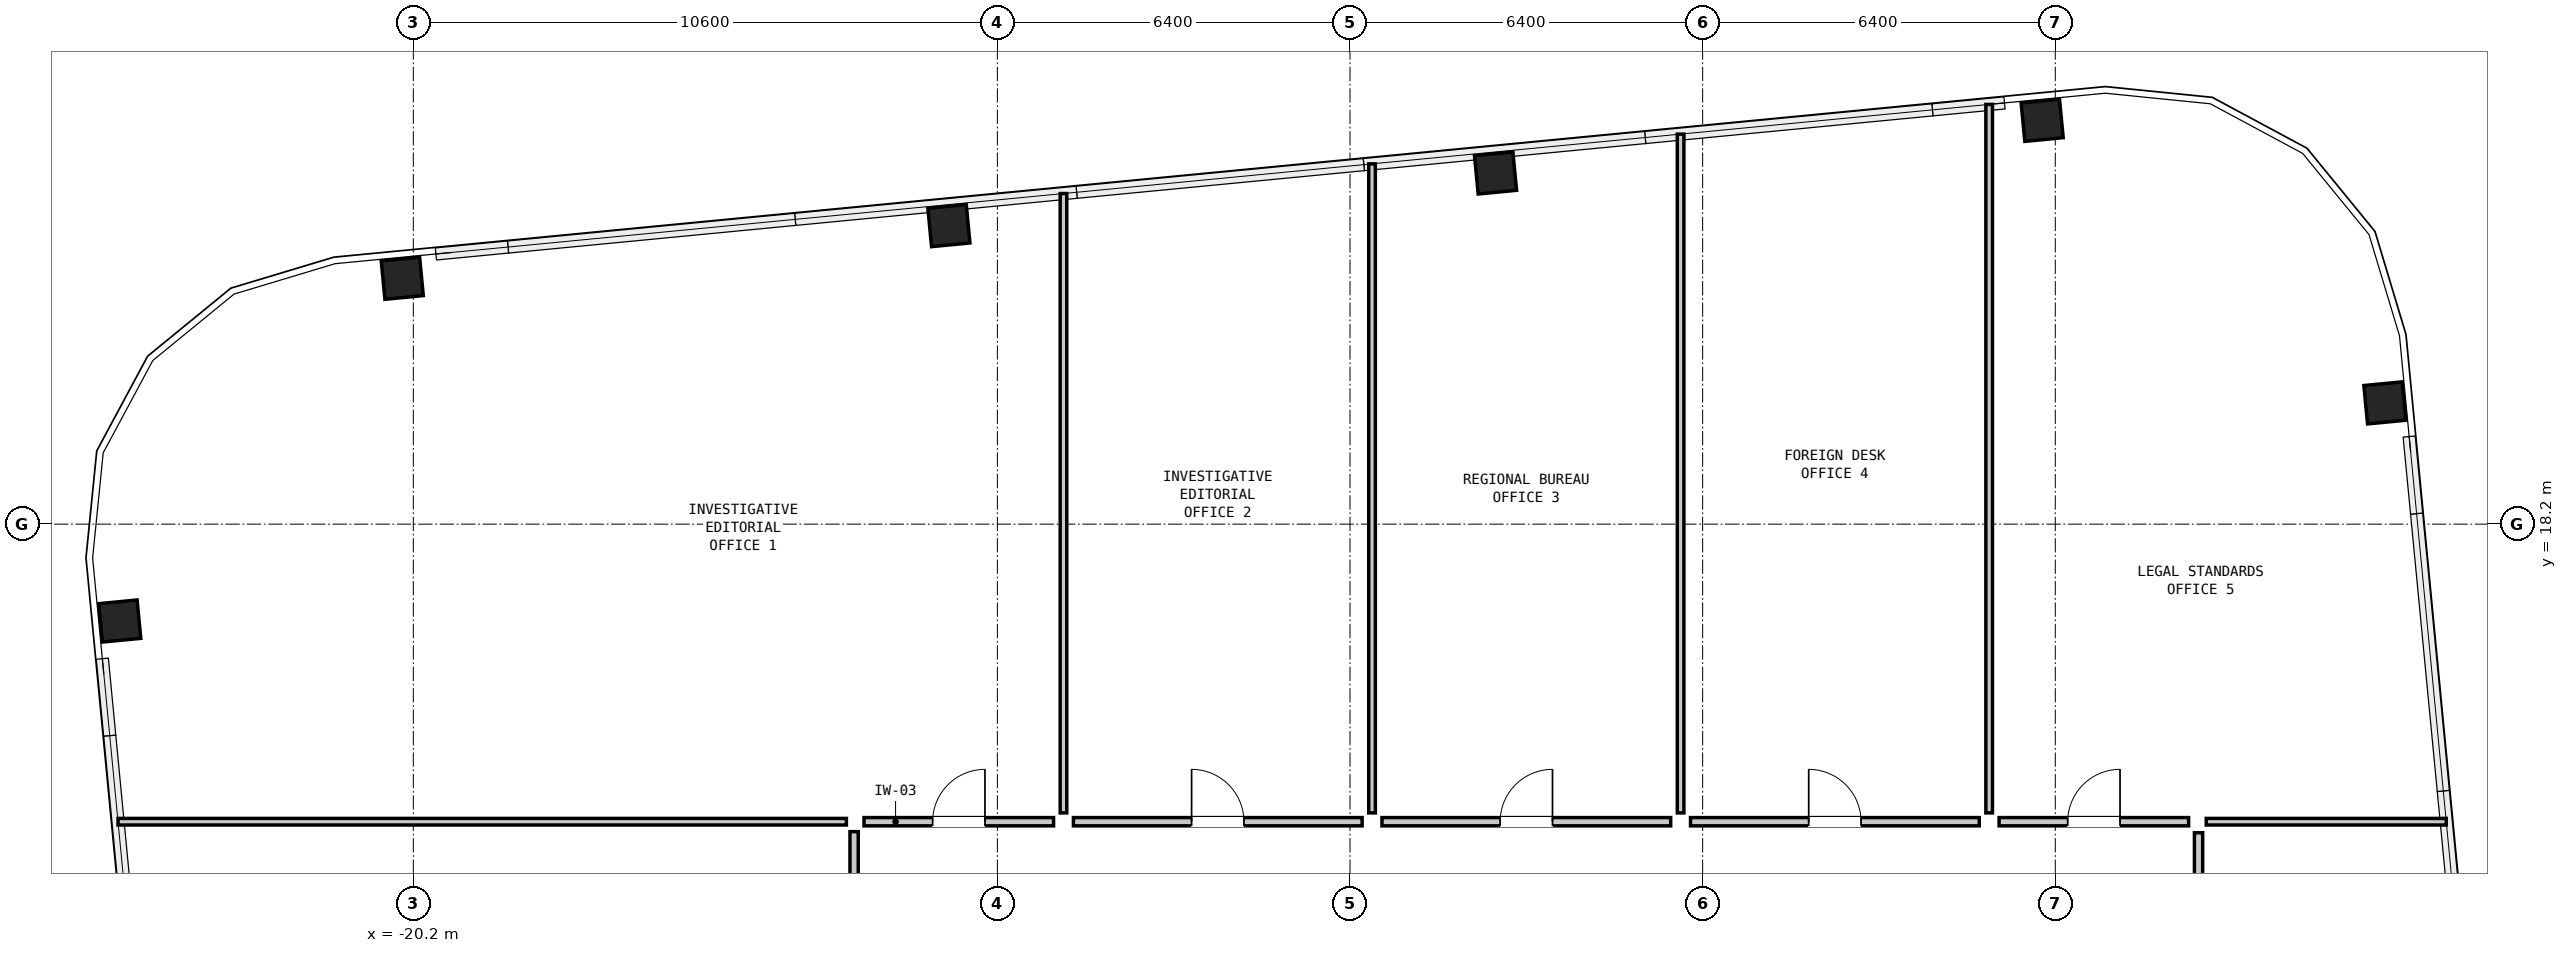
"""IFC4 building model, lengths in metres.
Left out: names, types, materials, properties, quantities, classifications, styles, units other than length and angle.
Written with IfcOpenShell. Run it as: python <this file> out.ifc"""

import sys

from ifc_helpers import new_model, si_unit, direction, frame, frame_2d, origin, origin_2d, place, context, subcontext, project, spatial, rectangle, hollow_rectangle, extrude, element, fill, save


model = new_model("IFC4")
c1 = context("Model", 3, precision=1e-05, world=origin(), true_north=direction((0.0, 1.0)))
c2 = subcontext(c1, "Body", "Model", "MODEL_VIEW")
j1 = project(units=[si_unit("LENGTHUNIT", "METRE"), si_unit("PLANEANGLEUNIT", "RADIAN")], contexts=[c1])
p1 = place(None, origin())
s1 = spatial("IfcSite", under=j1, at=p1, CompositionType="ELEMENT")
p2 = place(p1, origin())
s2 = spatial("IfcBuilding", under=s1, at=p2, CompositionType="ELEMENT")
p3 = place(p2, frame((0.0, 0.0, 165.3)))
s3 = spatial("IfcBuildingStorey", under=s2, at=p3, CompositionType="ELEMENT", Elevation=165.3)
for number, where, z_axis, x_axis in (
    (1, (15.582, 20.4, 0.0), (0.0, 0.0, 1.0), (-0.096, 0.995, 0.0)),
    (2, (9.362, 25.528, 0.0), (0.0, 0.0, 1.0), (0.995, 0.096, 0.0)),
    (3, (-0.559, 24.573, 0.0), (0.0, 0.0, 1.0), (0.995, 0.096, 0.0)),
    (4, (-10.479, 23.617, 0.0), (0.0, 0.0, 1.0), (0.995, 0.096, 0.0)),
    (5, (-20.4, 22.662, 0.0), (0.0, 0.0, 1.0), (0.995, 0.096, 0.0)),
    (6, (-25.528, 16.442, 0.0), (0.0, 0.0, 1.0), (-0.096, 0.995, 0.0)),
):
    element("IfcColumn", number, at=place(p3, frame(where, z_axis=z_axis, x_axis=x_axis)), inside=s3, PredefinedType="COLUMN", context=c2, shape_type="SweptSolid", body=[
        extrude(hollow_rectangle(XDim=0.7, YDim=0.7, WallThickness=0.045, at=origin_2d()), origin(), (0.0, 0.0, 1.0), 3.05),
    ])
p4 = place(p3, frame((-25.559, 12.8, 0.0), z_axis=(0.0, 0.0, 1.0), x_axis=(1.0, 0.0, 0.0)))
e7 = element("IfcWall", 7, at=p4, inside=s3, PredefinedType="PARTITIONING", context=c2, shape_type="SweptSolid", body=[
    extrude(rectangle(XDim=13.219, YDim=0.12, at=frame_2d((6.609, 0.0))), origin(), (0.0, 0.0, 1.0), 2.83),
])
p5 = place(p3, frame((12.34, 12.8, 0.0), z_axis=(0.0, 0.0, 1.0), x_axis=(1.0, 0.0, 0.0)))
e8 = element("IfcWall", 8, at=p5, inside=s3, PredefinedType="PARTITIONING", context=c2, shape_type="SweptSolid", body=[
    extrude(rectangle(XDim=4.355, YDim=0.12, at=frame_2d((2.178, 0.0))), origin(), (0.0, 0.0, 1.0), 2.83),
])
p6 = place(p3, frame((-8.4, 12.96, 0.0), z_axis=(0.0, 0.0, 1.0), x_axis=(0.0, 1.0, 0.0)))
e9 = element("IfcWall", 9, at=p6, inside=s3, PredefinedType="PARTITIONING", context=c2, shape_type="SweptSolid", body=[
    extrude(rectangle(XDim=11.239, YDim=0.12, at=frame_2d((5.62, 0.0))), origin(), (0.0, 0.0, 1.0), 2.83),
])
p7 = place(p3, frame((-2.8, 12.96, 0.0), z_axis=(0.0, 0.0, 1.0), x_axis=(0.0, 1.0, 0.0)))
e10 = element("IfcWall", 10, at=p7, inside=s3, PredefinedType="PARTITIONING", context=c2, shape_type="SweptSolid", body=[
    extrude(rectangle(XDim=11.779, YDim=0.12, at=frame_2d((5.889, 0.0))), origin(), (0.0, 0.0, 1.0), 2.347),
])
p8 = place(p3, frame((2.8, 12.96, 0.0), z_axis=(0.0, 0.0, 1.0), x_axis=(0.0, 1.0, 0.0)))
e11 = element("IfcWall", 11, at=p8, inside=s3, PredefinedType="PARTITIONING", context=c2, shape_type="SweptSolid", body=[
    extrude(rectangle(XDim=12.318, YDim=0.12, at=frame_2d((6.159, 0.0))), origin(), (0.0, 0.0, 1.0), 2.347),
])
p9 = place(p3, frame((8.4, 12.96, 0.0), z_axis=(0.0, 0.0, 1.0), x_axis=(0.0, 1.0, 0.0)))
e12 = element("IfcWall", 12, at=p9, inside=s3, PredefinedType="PARTITIONING", context=c2, shape_type="SweptSolid", body=[
    extrude(rectangle(XDim=12.857, YDim=0.12, at=frame_2d((6.428, 0.0))), origin(), (0.0, 0.0, 1.0), 2.83),
])
p10 = place(p3, frame((-12.02, 12.8, 0.0), z_axis=(0.0, 0.0, 1.0), x_axis=(1.0, 0.0, 0.0)))
e13 = element("IfcWall", 13, at=p10, inside=s3, PredefinedType="PARTITIONING", context=c2, shape_type="SweptSolid", body=[
    extrude(rectangle(XDim=3.44, YDim=0.15, at=frame_2d((1.72, 0.0))), origin(), (0.0, 0.0, 1.0), 2.83),
])
p11 = place(p10, frame((1.245, 0.0, 0.0)))
e14 = element("IfcOpeningElement", 14, at=p11, cuts=e13, PredefinedType="OPENING", context=c2, shape_type="SweptSolid", body=[
    extrude(rectangle(XDim=0.95, YDim=2.1, at=frame_2d((0.475, 1.05))), frame((0.0, 0.087, 0.0), z_axis=(0.0, -1.0, 0.0), x_axis=(1.0, 0.0, 0.0)), (0.0, 0.0, 1.0), 0.174),
])
p12 = place(p3, frame((-8.22, 12.8, 0.0), z_axis=(0.0, 0.0, 1.0), x_axis=(1.0, 0.0, 0.0)))
e15 = element("IfcWall", 15, at=p12, inside=s3, PredefinedType="PARTITIONING", context=c2, shape_type="SweptSolid", body=[
    extrude(rectangle(XDim=5.24, YDim=0.15, at=frame_2d((2.62, 0.0))), origin(), (0.0, 0.0, 1.0), 2.83),
])
p13 = place(p12, frame((2.145, 0.0, 0.0)))
e16 = element("IfcOpeningElement", 16, at=p13, cuts=e15, PredefinedType="OPENING", context=c2, shape_type="SweptSolid", body=[
    extrude(rectangle(XDim=0.95, YDim=2.1, at=frame_2d((0.475, 1.05))), frame((0.0, 0.087, 0.0), z_axis=(0.0, -1.0, 0.0), x_axis=(1.0, 0.0, 0.0)), (0.0, 0.0, 1.0), 0.174),
])
p14 = place(p3, frame((-2.62, 12.8, 0.0), z_axis=(0.0, 0.0, 1.0), x_axis=(1.0, 0.0, 0.0)))
e17 = element("IfcWall", 17, at=p14, inside=s3, PredefinedType="PARTITIONING", context=c2, shape_type="SweptSolid", body=[
    extrude(rectangle(XDim=5.24, YDim=0.15, at=frame_2d((2.62, 0.0))), origin(), (0.0, 0.0, 1.0), 2.83),
])
p15 = place(p14, frame((2.145, 0.0, 0.0)))
e18 = element("IfcOpeningElement", 18, at=p15, cuts=e17, PredefinedType="OPENING", context=c2, shape_type="SweptSolid", body=[
    extrude(rectangle(XDim=0.95, YDim=2.1, at=frame_2d((0.475, 1.05))), frame((0.0, 0.087, 0.0), z_axis=(0.0, -1.0, 0.0), x_axis=(1.0, 0.0, 0.0)), (0.0, 0.0, 1.0), 0.174),
])
p16 = place(p3, frame((2.98, 12.8, 0.0), z_axis=(0.0, 0.0, 1.0), x_axis=(1.0, 0.0, 0.0)))
e19 = element("IfcWall", 19, at=p16, inside=s3, PredefinedType="PARTITIONING", context=c2, shape_type="SweptSolid", body=[
    extrude(rectangle(XDim=5.24, YDim=0.15, at=frame_2d((2.62, 0.0))), origin(), (0.0, 0.0, 1.0), 2.83),
])
p17 = place(p16, frame((2.145, 0.0, 0.0)))
e20 = element("IfcOpeningElement", 20, at=p17, cuts=e19, PredefinedType="OPENING", context=c2, shape_type="SweptSolid", body=[
    extrude(rectangle(XDim=0.95, YDim=2.1, at=frame_2d((0.475, 1.05))), frame((0.0, 0.087, 0.0), z_axis=(0.0, -1.0, 0.0), x_axis=(1.0, 0.0, 0.0)), (0.0, 0.0, 1.0), 0.174),
])
p18 = place(p3, frame((8.58, 12.8, 0.0), z_axis=(0.0, 0.0, 1.0), x_axis=(1.0, 0.0, 0.0)))
e21 = element("IfcWall", 21, at=p18, inside=s3, PredefinedType="PARTITIONING", context=c2, shape_type="SweptSolid", body=[
    extrude(rectangle(XDim=3.44, YDim=0.15, at=frame_2d((1.72, 0.0))), origin(), (0.0, 0.0, 1.0), 2.83),
])
p19 = place(p18, frame((1.245, 0.0, 0.0)))
e22 = element("IfcOpeningElement", 22, at=p19, cuts=e21, PredefinedType="OPENING", context=c2, shape_type="SweptSolid", body=[
    extrude(rectangle(XDim=0.95, YDim=2.1, at=frame_2d((0.475, 1.05))), frame((0.0, 0.087, 0.0), z_axis=(0.0, -1.0, 0.0), x_axis=(1.0, 0.0, 0.0)), (0.0, 0.0, 1.0), 0.174),
])
p20 = place(p3, frame((-12.2, 0.18, 0.0), z_axis=(0.0, 0.0, 1.0), x_axis=(0.0, 1.0, 0.0)))
e23 = element("IfcWall", 23, at=p20, inside=s3, PredefinedType="PARTITIONING", context=c2, shape_type="SweptSolid", body=[
    extrude(rectangle(XDim=12.44, YDim=0.15, at=frame_2d((6.22, 0.0))), origin(), (0.0, 0.0, 1.0), 2.83),
])
p21 = place(p20, frame((5.745, 0.0, 0.0)))
e24 = element("IfcOpeningElement", 24, at=p21, cuts=e23, PredefinedType="OPENING", context=c2, shape_type="SweptSolid", body=[
    extrude(rectangle(XDim=0.95, YDim=2.1, at=frame_2d((0.475, 1.05))), frame((0.0, 0.087, 0.0), z_axis=(0.0, -1.0, 0.0), x_axis=(1.0, 0.0, 0.0)), (0.0, 0.0, 1.0), 0.174),
])
p22 = place(p3, frame((12.2, 3.8, 0.0), z_axis=(0.0, 0.0, 1.0), x_axis=(0.0, 1.0, 0.0)))
e25 = element("IfcWall", 25, at=p22, inside=s3, PredefinedType="PARTITIONING", context=c2, shape_type="SweptSolid", body=[
    extrude(rectangle(XDim=8.8, YDim=0.15, at=frame_2d((4.4, 0.0))), origin(), (0.0, 0.0, 1.0), 2.83),
])
p23 = place(p22, frame((3.925, 0.0, 0.0)))
e26 = element("IfcOpeningElement", 26, at=p23, cuts=e25, PredefinedType="OPENING", context=c2, shape_type="SweptSolid", body=[
    extrude(rectangle(XDim=0.95, YDim=2.1, at=frame_2d((0.475, 1.05))), frame((0.0, 0.087, 0.0), z_axis=(0.0, -1.0, 0.0), x_axis=(1.0, 0.0, 0.0)), (0.0, 0.0, 1.0), 0.174),
])
p24 = place(p11, origin())
e27 = element("IfcDoor", 27, at=p24, inside=s3, OperationType="SINGLE_SWING_RIGHT", PredefinedType="DOOR", context=c2, shape_type="SweptSolid", body=[
    extrude(rectangle(XDim=0.95, YDim=2.1, at=frame_2d((0.475, 1.05))), frame((0.0, 0.025, 0.0), z_axis=(0.0, -1.0, 0.0), x_axis=(1.0, 0.0, 0.0)), (0.0, 0.0, 1.0), 0.05),
])
fill(e14, e27)
p25 = place(p13, origin())
e28 = element("IfcDoor", 28, at=p25, inside=s3, OperationType="SINGLE_SWING_LEFT", PredefinedType="DOOR", context=c2, shape_type="SweptSolid", body=[
    extrude(rectangle(XDim=0.95, YDim=2.1, at=frame_2d((0.475, 1.05))), frame((0.0, 0.025, 0.0), z_axis=(0.0, -1.0, 0.0), x_axis=(1.0, 0.0, 0.0)), (0.0, 0.0, 1.0), 0.05),
])
fill(e16, e28)
p26 = place(p15, origin())
e29 = element("IfcDoor", 29, at=p26, inside=s3, OperationType="SINGLE_SWING_RIGHT", PredefinedType="DOOR", context=c2, shape_type="SweptSolid", body=[
    extrude(rectangle(XDim=0.95, YDim=2.1, at=frame_2d((0.475, 1.05))), frame((0.0, 0.025, 0.0), z_axis=(0.0, -1.0, 0.0), x_axis=(1.0, 0.0, 0.0)), (0.0, 0.0, 1.0), 0.05),
])
fill(e18, e29)
p27 = place(p17, origin())
e30 = element("IfcDoor", 30, at=p27, inside=s3, OperationType="SINGLE_SWING_LEFT", PredefinedType="DOOR", context=c2, shape_type="SweptSolid", body=[
    extrude(rectangle(XDim=0.95, YDim=2.1, at=frame_2d((0.475, 1.05))), frame((0.0, 0.025, 0.0), z_axis=(0.0, -1.0, 0.0), x_axis=(1.0, 0.0, 0.0)), (0.0, 0.0, 1.0), 0.05),
])
fill(e20, e30)
p28 = place(p19, origin())
e31 = element("IfcDoor", 31, at=p28, inside=s3, OperationType="SINGLE_SWING_RIGHT", PredefinedType="DOOR", context=c2, shape_type="SweptSolid", body=[
    extrude(rectangle(XDim=0.95, YDim=2.1, at=frame_2d((0.475, 1.05))), frame((0.0, 0.025, 0.0), z_axis=(0.0, -1.0, 0.0), x_axis=(1.0, 0.0, 0.0)), (0.0, 0.0, 1.0), 0.05),
])
fill(e22, e31)
save(model, sys.argv[1])
